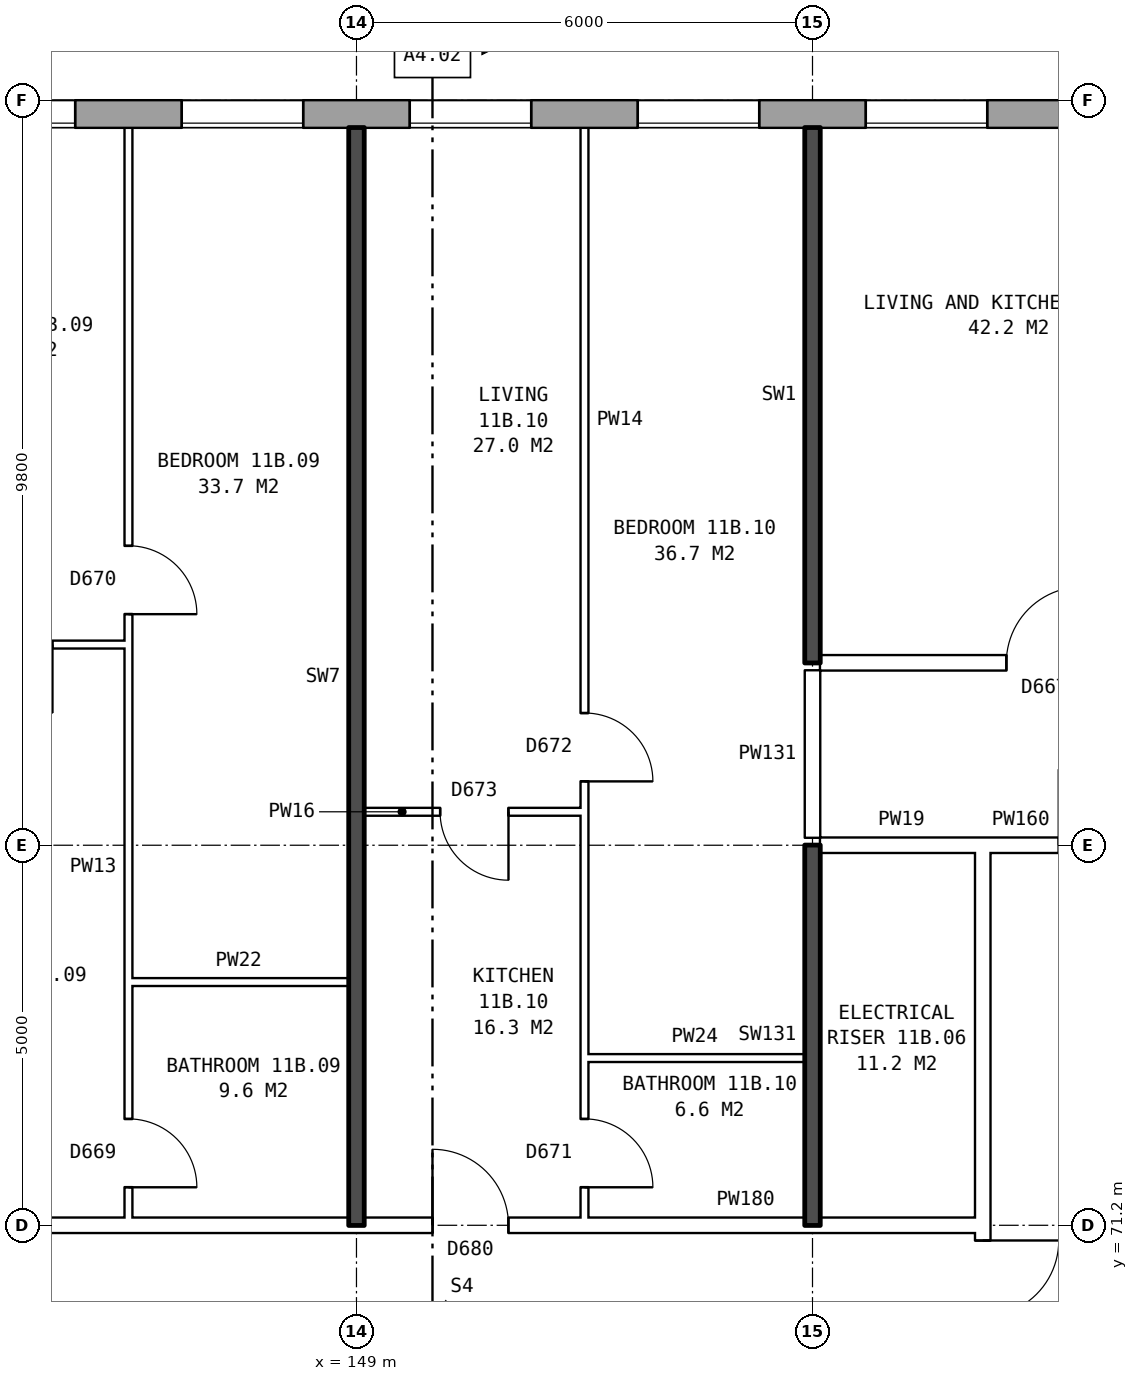
"""IFC4 building model, lengths in metres.
Left out: names, types, materials, properties, quantities, classifications, styles, units other than length and angle.
Written with IfcOpenShell. Run it as: python <this file> out.ifc"""

import sys

from ifc_helpers import new_model, si_unit, direction, frame, frame_2d, origin, place, context, subcontext, project, spatial, rectangle, extrude, element, fill, save


model = new_model("IFC4")
c1 = context("Model", 3, precision=1e-05, world=origin(), true_north=direction((0.0, 1.0)))
c2 = subcontext(c1, "Body", "Model", "MODEL_VIEW")
j1 = project(units=[si_unit("LENGTHUNIT", "METRE"), si_unit("PLANEANGLEUNIT", "RADIAN")], contexts=[c1])
p1 = place(None, origin())
s1 = spatial("IfcSite", under=j1, at=p1, CompositionType="ELEMENT")
p2 = place(p1, origin())
s2 = spatial("IfcBuilding", under=s1, at=p2, CompositionType="ELEMENT")
p3 = place(p2, frame((0.0, 0.0, 44.3)))
s3 = spatial("IfcBuildingStorey", under=s2, at=p3, CompositionType="ELEMENT", Elevation=44.3)
p4 = place(p3, frame((173.425, 85.82, 0.0), z_axis=(0.0, 0.0, 1.0), x_axis=(-1.0, 0.0, 0.0)))
e1 = element("IfcWall", 1, at=p4, inside=s3, PredefinedType="STANDARD", context=c2, shape_type="SweptSolid", body=[
    extrude(rectangle(XDim=39.351, YDim=0.36, at=frame_2d((19.675, 0.0))), origin(), (0.0, 0.0, 1.0), 2.85),
])
p5 = place(p4, frame((1.125, 0.0, 0.8)))
e2 = element("IfcOpeningElement", 2, at=p5, cuts=e1, PredefinedType="OPENING", context=c2, shape_type="SweptSolid", body=[
    extrude(rectangle(XDim=1.6, YDim=1.8, at=frame_2d((0.8, 0.9))), frame((0.0, 0.19, 0.0), z_axis=(0.0, -1.0, 0.0), x_axis=(1.0, 0.0, 0.0)), (0.0, 0.0, 1.0), 0.38),
])
p6 = place(p4, frame((4.125, 0.0, 0.8)))
e3 = element("IfcOpeningElement", 3, at=p6, cuts=e1, PredefinedType="OPENING", context=c2, shape_type="SweptSolid", body=[
    extrude(rectangle(XDim=1.6, YDim=1.8, at=frame_2d((0.8, 0.9))), frame((0.0, 0.19, 0.0), z_axis=(0.0, -1.0, 0.0), x_axis=(1.0, 0.0, 0.0)), (0.0, 0.0, 1.0), 0.38),
])
p7 = place(p4, frame((7.125, 0.0, 0.8)))
e4 = element("IfcOpeningElement", 4, at=p7, cuts=e1, PredefinedType="OPENING", context=c2, shape_type="SweptSolid", body=[
    extrude(rectangle(XDim=1.6, YDim=1.8, at=frame_2d((0.8, 0.9))), frame((0.0, 0.19, 0.0), z_axis=(0.0, -1.0, 0.0), x_axis=(1.0, 0.0, 0.0)), (0.0, 0.0, 1.0), 0.38),
])
p8 = place(p4, frame((10.125, 0.0, 0.8)))
e5 = element("IfcOpeningElement", 5, at=p8, cuts=e1, PredefinedType="OPENING", context=c2, shape_type="SweptSolid", body=[
    extrude(rectangle(XDim=1.6, YDim=1.8, at=frame_2d((0.8, 0.9))), frame((0.0, 0.19, 0.0), z_axis=(0.0, -1.0, 0.0), x_axis=(1.0, 0.0, 0.0)), (0.0, 0.0, 1.0), 0.38),
])
p9 = place(p4, frame((13.125, 0.0, 0.8)))
e6 = element("IfcOpeningElement", 6, at=p9, cuts=e1, PredefinedType="OPENING", context=c2, shape_type="SweptSolid", body=[
    extrude(rectangle(XDim=1.6, YDim=1.8, at=frame_2d((0.8, 0.9))), frame((0.0, 0.19, 0.0), z_axis=(0.0, -1.0, 0.0), x_axis=(1.0, 0.0, 0.0)), (0.0, 0.0, 1.0), 0.38),
])
p10 = place(p4, frame((16.125, 0.0, 0.8)))
e7 = element("IfcOpeningElement", 7, at=p10, cuts=e1, PredefinedType="OPENING", context=c2, shape_type="SweptSolid", body=[
    extrude(rectangle(XDim=1.6, YDim=1.8, at=frame_2d((0.8, 0.9))), frame((0.0, 0.19, 0.0), z_axis=(0.0, -1.0, 0.0), x_axis=(1.0, 0.0, 0.0)), (0.0, 0.0, 1.0), 0.38),
])
p11 = place(p4, frame((19.125, 0.0, 0.8)))
e8 = element("IfcOpeningElement", 8, at=p11, cuts=e1, PredefinedType="OPENING", context=c2, shape_type="SweptSolid", body=[
    extrude(rectangle(XDim=1.6, YDim=1.8, at=frame_2d((0.8, 0.9))), frame((0.0, 0.19, 0.0), z_axis=(0.0, -1.0, 0.0), x_axis=(1.0, 0.0, 0.0)), (0.0, 0.0, 1.0), 0.38),
])
p12 = place(p4, frame((22.125, 0.0, 0.8)))
e9 = element("IfcOpeningElement", 9, at=p12, cuts=e1, PredefinedType="OPENING", context=c2, shape_type="SweptSolid", body=[
    extrude(rectangle(XDim=1.6, YDim=1.8, at=frame_2d((0.8, 0.9))), frame((0.0, 0.19, 0.0), z_axis=(0.0, -1.0, 0.0), x_axis=(1.0, 0.0, 0.0)), (0.0, 0.0, 1.0), 0.38),
])
p13 = place(p4, frame((25.125, 0.0, 0.8)))
e10 = element("IfcOpeningElement", 10, at=p13, cuts=e1, PredefinedType="OPENING", context=c2, shape_type="SweptSolid", body=[
    extrude(rectangle(XDim=1.6, YDim=1.8, at=frame_2d((0.8, 0.9))), frame((0.0, 0.19, 0.0), z_axis=(0.0, -1.0, 0.0), x_axis=(1.0, 0.0, 0.0)), (0.0, 0.0, 1.0), 0.38),
])
p14 = place(p4, frame((28.125, 0.0, 0.8)))
e11 = element("IfcOpeningElement", 11, at=p14, cuts=e1, PredefinedType="OPENING", context=c2, shape_type="SweptSolid", body=[
    extrude(rectangle(XDim=1.6, YDim=1.8, at=frame_2d((0.8, 0.9))), frame((0.0, 0.19, 0.0), z_axis=(0.0, -1.0, 0.0), x_axis=(1.0, 0.0, 0.0)), (0.0, 0.0, 1.0), 0.38),
])
p15 = place(p4, frame((31.125, 0.0, 0.8)))
e12 = element("IfcOpeningElement", 12, at=p15, cuts=e1, PredefinedType="OPENING", context=c2, shape_type="SweptSolid", body=[
    extrude(rectangle(XDim=1.6, YDim=1.8, at=frame_2d((0.8, 0.9))), frame((0.0, 0.19, 0.0), z_axis=(0.0, -1.0, 0.0), x_axis=(1.0, 0.0, 0.0)), (0.0, 0.0, 1.0), 0.38),
])
p16 = place(p4, frame((34.125, 0.0, 0.8)))
e13 = element("IfcOpeningElement", 13, at=p16, cuts=e1, PredefinedType="OPENING", context=c2, shape_type="SweptSolid", body=[
    extrude(rectangle(XDim=1.6, YDim=1.8, at=frame_2d((0.8, 0.9))), frame((0.0, 0.19, 0.0), z_axis=(0.0, -1.0, 0.0), x_axis=(1.0, 0.0, 0.0)), (0.0, 0.0, 1.0), 0.38),
])
p17 = place(p4, frame((36.625, 0.0, 0.8)))
e14 = element("IfcOpeningElement", 14, at=p17, cuts=e1, PredefinedType="OPENING", context=c2, shape_type="SweptSolid", body=[
    extrude(rectangle(XDim=1.4, YDim=1.8, at=frame_2d((0.7, 0.9))), frame((0.0, 0.19, 0.0), z_axis=(0.0, -1.0, 0.0), x_axis=(1.0, 0.0, 0.0)), (0.0, 0.0, 1.0), 0.38),
])
p18 = place(p4, frame((38.325, 0.0, 0.8)))
e15 = element("IfcOpeningElement", 15, at=p18, cuts=e1, PredefinedType="OPENING", context=c2, shape_type="SweptSolid", body=[
    extrude(rectangle(XDim=0.6, YDim=0.9, at=frame_2d((0.3, 0.45))), frame((0.0, 0.19, 0.0), z_axis=(0.0, -1.0, 0.0), x_axis=(1.0, 0.0, 0.0)), (0.0, 0.0, 1.0), 0.38),
])
p19 = place(p3, frame((157.24, 63.9, 0.0), z_axis=(0.0, 0.0, 1.0), x_axis=(0.0, 1.0, 0.0)))
e16 = element("IfcWall", 16, at=p19, inside=s3, PredefinedType="PARTITIONING", context=c2, shape_type="SweptSolid", body=[
    extrude(rectangle(XDim=12.2, YDim=0.2, at=frame_2d((6.1, 0.0))), origin(), (0.0, 0.0, 1.0), 2.85),
])
p20 = place(p19, frame((5.1, 0.0, 0.0)))
e17 = element("IfcOpeningElement", 17, at=p20, cuts=e16, PredefinedType="OPENING", context=c2, shape_type="SweptSolid", body=[
    extrude(rectangle(XDim=2.0, YDim=2.1, at=frame_2d((1.0, 1.05))), frame((0.0, 0.11, 0.0), z_axis=(0.0, -1.0, 0.0), x_axis=(1.0, 0.0, 0.0)), (0.0, 0.0, 1.0), 0.22),
])
p21 = place(p3, frame((142.76, 71.2, 0.0), z_axis=(0.0, 0.0, 1.0), x_axis=(1.0, 0.0, 0.0)))
e18 = element("IfcWall", 18, at=p21, inside=s3, PredefinedType="PARTITIONING", context=c2, shape_type="SweptSolid", body=[
    extrude(rectangle(XDim=14.48, YDim=0.2, at=frame_2d((7.24, 0.0))), origin(), (0.0, 0.0, 1.0), 2.85),
])
p22 = place(p21, frame((1.12, 0.0, 0.0)))
e19 = element("IfcOpeningElement", 19, at=p22, cuts=e18, PredefinedType="OPENING", context=c2, shape_type="SweptSolid", body=[
    extrude(rectangle(XDim=1.0, YDim=2.1, at=frame_2d((0.5, 1.05))), frame((0.0, 0.11, 0.0), z_axis=(0.0, -1.0, 0.0), x_axis=(1.0, 0.0, 0.0)), (0.0, 0.0, 1.0), 0.22),
])
p23 = place(p21, frame((7.24, 0.0, 0.0)))
e20 = element("IfcOpeningElement", 20, at=p23, cuts=e18, PredefinedType="OPENING", context=c2, shape_type="SweptSolid", body=[
    extrude(rectangle(XDim=1.0, YDim=2.1, at=frame_2d((0.5, 1.05))), frame((0.0, 0.11, 0.0), z_axis=(0.0, -1.0, 0.0), x_axis=(1.0, 0.0, 0.0)), (0.0, 0.0, 1.0), 0.22),
])
for number, where, z_axis, x_axis in (
    (21, (152.0, 73.4, 0.0), (0.0, 0.0, 1.0), (1.0, 0.0, 0.0)),
    (22, (146.0, 74.4, 0.0), (0.0, 0.0, 1.0), (1.0, 0.0, 0.0)),
):
    element("IfcWall", number, at=place(p3, frame(where, z_axis=z_axis, x_axis=x_axis)), inside=s3, PredefinedType="PARTITIONING", context=c2, shape_type="SweptSolid", body=[
        extrude(rectangle(XDim=2.9, YDim=0.1, at=frame_2d((1.45, 0.0))), origin(), (0.0, 0.0, 1.0), 2.85),
    ])
p24 = place(p3, frame((155.1, 76.2, 0.0), z_axis=(0.0, 0.0, 1.0), x_axis=(1.0, 0.0, 0.0)))
e23 = element("IfcWall", 23, at=p24, inside=s3, PredefinedType="PARTITIONING", context=c2, shape_type="SweptSolid", body=[
    extrude(rectangle(XDim=2.14, YDim=0.2, at=frame_2d((1.07, 0.0))), origin(), (0.0, 0.0, 1.0), 2.85),
])
p25 = place(p3, frame((157.24, 76.2, 0.0), z_axis=(0.0, 0.0, 1.0), x_axis=(1.0, 0.0, 0.0)))
e24 = element("IfcWall", 24, at=p25, inside=s3, PredefinedType="PARTITIONING", context=c2, shape_type="SweptSolid", body=[
    extrude(rectangle(XDim=3.0, YDim=0.2, at=frame_2d((1.5, 0.0))), origin(), (0.0, 0.0, 1.0), 2.85),
])
p26 = place(p25, frame((1.0, 0.0, 0.0)))
e25 = element("IfcOpeningElement", 25, at=p26, cuts=e24, PredefinedType="OPENING", context=c2, shape_type="SweptSolid", body=[
    extrude(rectangle(XDim=1.0, YDim=2.1, at=frame_2d((0.5, 1.05))), frame((0.0, 0.11, 0.0), z_axis=(0.0, -1.0, 0.0), x_axis=(1.0, 0.0, 0.0)), (0.0, 0.0, 1.0), 0.22),
])
p27 = place(p3, frame((149.1, 76.64, 0.0), z_axis=(0.0, 0.0, 1.0), x_axis=(1.0, 0.0, 0.0)))
e26 = element("IfcWall", 26, at=p27, inside=s3, PredefinedType="PARTITIONING", context=c2, shape_type="SweptSolid", body=[
    extrude(rectangle(XDim=2.9, YDim=0.1, at=frame_2d((1.45, 0.0))), origin(), (0.0, 0.0, 1.0), 2.85),
])
p28 = place(p27, frame((1.0, 0.0, 0.0)))
e27 = element("IfcOpeningElement", 27, at=p28, cuts=e26, PredefinedType="OPENING", context=c2, shape_type="SweptSolid", body=[
    extrude(rectangle(XDim=0.9, YDim=2.1, at=frame_2d((0.45, 1.05))), frame((0.0, 0.06, 0.0), z_axis=(0.0, -1.0, 0.0), x_axis=(1.0, 0.0, 0.0)), (0.0, 0.0, 1.0), 0.12),
])
p29 = place(p3, frame((155.1, 78.6, 0.0), z_axis=(0.0, 0.0, 1.0), x_axis=(1.0, 0.0, 0.0)))
e28 = element("IfcWall", 28, at=p29, inside=s3, PredefinedType="PARTITIONING", context=c2, shape_type="SweptSolid", body=[
    extrude(rectangle(XDim=21.04, YDim=0.2, at=frame_2d((10.52, 0.0))), origin(), (0.0, 0.0, 1.0), 2.85),
])
p30 = place(p29, frame((2.45, 0.0, 0.0)))
e29 = element("IfcOpeningElement", 29, at=p30, cuts=e28, PredefinedType="OPENING", context=c2, shape_type="SweptSolid", body=[
    extrude(rectangle(XDim=1.0, YDim=2.1, at=frame_2d((0.5, 1.05))), frame((0.0, 0.11, 0.0), z_axis=(0.0, -1.0, 0.0), x_axis=(1.0, 0.0, 0.0)), (0.0, 0.0, 1.0), 0.22),
])
p31 = place(p29, frame((14.4, 0.0, 0.0)))
e30 = element("IfcOpeningElement", 30, at=p31, cuts=e28, PredefinedType="OPENING", context=c2, shape_type="SweptSolid", body=[
    extrude(rectangle(XDim=1.0, YDim=2.1, at=frame_2d((0.5, 1.05))), frame((0.0, 0.11, 0.0), z_axis=(0.0, -1.0, 0.0), x_axis=(1.0, 0.0, 0.0)), (0.0, 0.0, 1.0), 0.22),
])
p32 = place(p3, frame((143.1, 78.84, 0.0), z_axis=(0.0, 0.0, 1.0), x_axis=(1.0, 0.0, 0.0)))
e31 = element("IfcWall", 31, at=p32, inside=s3, PredefinedType="PARTITIONING", context=c2, shape_type="SweptSolid", body=[
    extrude(rectangle(XDim=2.9, YDim=0.1, at=frame_2d((1.45, 0.0))), origin(), (0.0, 0.0, 1.0), 2.85),
])
p33 = place(p32, frame((1.0, 0.0, 0.0)))
e32 = element("IfcOpeningElement", 32, at=p33, cuts=e31, PredefinedType="OPENING", context=c2, shape_type="SweptSolid", body=[
    extrude(rectangle(XDim=0.9, YDim=2.1, at=frame_2d((0.45, 1.05))), frame((0.0, 0.06, 0.0), z_axis=(0.0, -1.0, 0.0), x_axis=(1.0, 0.0, 0.0)), (0.0, 0.0, 1.0), 0.12),
])
p34 = place(p3, frame((146.0, 71.3, 0.0), z_axis=(0.0, 0.0, 1.0), x_axis=(0.0, 1.0, 0.0)))
e33 = element("IfcWall", 33, at=p34, inside=s3, PredefinedType="PARTITIONING", context=c2, shape_type="SweptSolid", body=[
    extrude(rectangle(XDim=14.34, YDim=0.1, at=frame_2d((7.17, 0.0))), origin(), (0.0, 0.0, 1.0), 2.85),
])
p35 = place(p34, frame((7.94, 0.0, 0.0)))
e34 = element("IfcOpeningElement", 34, at=p35, cuts=e33, PredefinedType="OPENING", context=c2, shape_type="SweptSolid", body=[
    extrude(rectangle(XDim=0.9, YDim=2.1, at=frame_2d((0.45, 1.05))), frame((0.0, 0.06, 0.0), z_axis=(0.0, -1.0, 0.0), x_axis=(1.0, 0.0, 0.0)), (0.0, 0.0, 1.0), 0.12),
])
p36 = place(p34, frame((0.4, 0.0, 0.0)))
e35 = element("IfcOpeningElement", 35, at=p36, cuts=e33, PredefinedType="OPENING", context=c2, shape_type="SweptSolid", body=[
    extrude(rectangle(XDim=0.9, YDim=2.1, at=frame_2d((0.45, 1.05))), frame((0.0, 0.06, 0.0), z_axis=(0.0, -1.0, 0.0), x_axis=(1.0, 0.0, 0.0)), (0.0, 0.0, 1.0), 0.12),
])
p37 = place(p3, frame((149.0, 71.2, 0.0), z_axis=(0.0, 0.0, 1.0), x_axis=(0.0, 1.0, 0.0)))
e36 = element("IfcWall", 36, at=p37, inside=s3, PredefinedType="SOLIDWALL", context=c2, shape_type="SweptSolid", body=[
    extrude(rectangle(XDim=14.44, YDim=0.2, at=frame_2d((7.22, 0.0))), origin(), (0.0, 0.0, 1.0), 2.85),
])
p38 = place(p3, frame((152.0, 71.3, 0.0), z_axis=(0.0, 0.0, 1.0), x_axis=(0.0, 1.0, 0.0)))
e37 = element("IfcWall", 37, at=p38, inside=s3, PredefinedType="PARTITIONING", context=c2, shape_type="SweptSolid", body=[
    extrude(rectangle(XDim=14.34, YDim=0.1, at=frame_2d((7.17, 0.0))), origin(), (0.0, 0.0, 1.0), 2.85),
])
p39 = place(p38, frame((5.74, 0.0, 0.0)))
e38 = element("IfcOpeningElement", 38, at=p39, cuts=e37, PredefinedType="OPENING", context=c2, shape_type="SweptSolid", body=[
    extrude(rectangle(XDim=0.9, YDim=2.1, at=frame_2d((0.45, 1.05))), frame((0.0, 0.06, 0.0), z_axis=(0.0, -1.0, 0.0), x_axis=(1.0, 0.0, 0.0)), (0.0, 0.0, 1.0), 0.12),
])
p40 = place(p38, frame((0.4, 0.0, 0.0)))
e39 = element("IfcOpeningElement", 39, at=p40, cuts=e37, PredefinedType="OPENING", context=c2, shape_type="SweptSolid", body=[
    extrude(rectangle(XDim=0.9, YDim=2.1, at=frame_2d((0.45, 1.05))), frame((0.0, 0.06, 0.0), z_axis=(0.0, -1.0, 0.0), x_axis=(1.0, 0.0, 0.0)), (0.0, 0.0, 1.0), 0.12),
])
p41 = place(p3, frame((155.0, 71.2, 0.0), z_axis=(0.0, 0.0, 1.0), x_axis=(0.0, 1.0, 0.0)))
e40 = element("IfcWall", 40, at=p41, inside=s3, PredefinedType="SOLIDWALL", context=c2, shape_type="SweptSolid", body=[
    extrude(rectangle(XDim=5.0, YDim=0.2, at=frame_2d((2.5, 0.0))), origin(), (0.0, 0.0, 1.0), 2.85),
])
p42 = place(p3, frame((155.0, 76.3, 0.0), z_axis=(0.0, 0.0, 1.0), x_axis=(0.0, 1.0, 0.0)))
e41 = element("IfcWall", 41, at=p42, inside=s3, PredefinedType="PARTITIONING", context=c2, shape_type="SweptSolid", body=[
    extrude(rectangle(XDim=2.2, YDim=0.2, at=frame_2d((1.1, 0.0))), origin(), (0.0, 0.0, 1.0), 2.85),
])
p43 = place(p3, frame((155.0, 78.6, 0.0), z_axis=(0.0, 0.0, 1.0), x_axis=(0.0, 1.0, 0.0)))
e42 = element("IfcWall", 42, at=p43, inside=s3, PredefinedType="SOLIDWALL", context=c2, shape_type="SweptSolid", body=[
    extrude(rectangle(XDim=7.04, YDim=0.2, at=frame_2d((3.52, 0.0))), origin(), (0.0, 0.0, 1.0), 2.85),
])
p44 = place(p10, origin())
e43 = element("IfcWindow", 43, at=p44, inside=s3, PartitioningType="SINGLE_PANEL", PredefinedType="WINDOW", context=c2, shape_type="SweptSolid", body=[
    extrude(rectangle(XDim=1.6, YDim=1.8, at=frame_2d((0.8, 0.9))), frame((0.0, 0.15, 0.0), z_axis=(0.0, -1.0, 0.0), x_axis=(1.0, 0.0, 0.0)), (0.0, 0.0, 1.0), 0.06),
])
fill(e7, e43)
p45 = place(p11, origin())
e44 = element("IfcWindow", 44, at=p45, inside=s3, PartitioningType="SINGLE_PANEL", PredefinedType="WINDOW", context=c2, shape_type="SweptSolid", body=[
    extrude(rectangle(XDim=1.6, YDim=1.8, at=frame_2d((0.8, 0.9))), frame((0.0, 0.15, 0.0), z_axis=(0.0, -1.0, 0.0), x_axis=(1.0, 0.0, 0.0)), (0.0, 0.0, 1.0), 0.06),
])
fill(e8, e44)
p46 = place(p12, origin())
e45 = element("IfcWindow", 45, at=p46, inside=s3, PartitioningType="SINGLE_PANEL", PredefinedType="WINDOW", context=c2, shape_type="SweptSolid", body=[
    extrude(rectangle(XDim=1.6, YDim=1.8, at=frame_2d((0.8, 0.9))), frame((0.0, 0.15, 0.0), z_axis=(0.0, -1.0, 0.0), x_axis=(1.0, 0.0, 0.0)), (0.0, 0.0, 1.0), 0.06),
])
fill(e9, e45)
p47 = place(p13, origin())
e46 = element("IfcWindow", 46, at=p47, inside=s3, PartitioningType="SINGLE_PANEL", PredefinedType="WINDOW", context=c2, shape_type="SweptSolid", body=[
    extrude(rectangle(XDim=1.6, YDim=1.8, at=frame_2d((0.8, 0.9))), frame((0.0, 0.15, 0.0), z_axis=(0.0, -1.0, 0.0), x_axis=(1.0, 0.0, 0.0)), (0.0, 0.0, 1.0), 0.06),
])
fill(e10, e46)
p48 = place(p14, origin())
e47 = element("IfcWindow", 47, at=p48, inside=s3, PartitioningType="SINGLE_PANEL", PredefinedType="WINDOW", context=c2, shape_type="SweptSolid", body=[
    extrude(rectangle(XDim=1.6, YDim=1.8, at=frame_2d((0.8, 0.9))), frame((0.0, 0.15, 0.0), z_axis=(0.0, -1.0, 0.0), x_axis=(1.0, 0.0, 0.0)), (0.0, 0.0, 1.0), 0.06),
])
fill(e11, e47)
p49 = place(p20, frame((2.0, 0.0, 0.0), z_axis=(0.0, 0.0, 1.0), x_axis=(-1.0, 0.0, 0.0)))
e48 = element("IfcDoor", 48, at=p49, inside=s3, OperationType="DOUBLE_DOOR_SINGLE_SWING", PredefinedType="DOOR", context=c2, shape_type="SweptSolid", body=[
    extrude(rectangle(XDim=2.0, YDim=2.1, at=frame_2d((1.0, 1.05))), frame((0.0, 0.025, 0.0), z_axis=(0.0, -1.0, 0.0), x_axis=(1.0, 0.0, 0.0)), (0.0, 0.0, 1.0), 0.05),
])
fill(e17, e48)
p50 = place(p35, frame((0.9, 0.0, 0.0), z_axis=(0.0, 0.0, 1.0), x_axis=(-1.0, 0.0, 0.0)))
e49 = element("IfcDoor", 49, at=p50, inside=s3, OperationType="SINGLE_SWING_RIGHT", PredefinedType="DOOR", context=c2, shape_type="SweptSolid", body=[
    extrude(rectangle(XDim=0.9, YDim=2.1, at=frame_2d((0.45, 1.05))), frame((0.0, 0.025, 0.0), z_axis=(0.0, -1.0, 0.0), x_axis=(1.0, 0.0, 0.0)), (0.0, 0.0, 1.0), 0.05),
])
fill(e34, e49)
p51 = place(p36, frame((0.9, 0.0, 0.0), z_axis=(0.0, 0.0, 1.0), x_axis=(-1.0, 0.0, 0.0)))
e50 = element("IfcDoor", 50, at=p51, inside=s3, OperationType="SINGLE_SWING_RIGHT", PredefinedType="DOOR", context=c2, shape_type="SweptSolid", body=[
    extrude(rectangle(XDim=0.9, YDim=2.1, at=frame_2d((0.45, 1.05))), frame((0.0, 0.025, 0.0), z_axis=(0.0, -1.0, 0.0), x_axis=(1.0, 0.0, 0.0)), (0.0, 0.0, 1.0), 0.05),
])
fill(e35, e50)
p52 = place(p39, frame((0.9, 0.0, 0.0), z_axis=(0.0, 0.0, 1.0), x_axis=(-1.0, 0.0, 0.0)))
e51 = element("IfcDoor", 51, at=p52, inside=s3, OperationType="SINGLE_SWING_RIGHT", PredefinedType="DOOR", context=c2, shape_type="SweptSolid", body=[
    extrude(rectangle(XDim=0.9, YDim=2.1, at=frame_2d((0.45, 1.05))), frame((0.0, 0.025, 0.0), z_axis=(0.0, -1.0, 0.0), x_axis=(1.0, 0.0, 0.0)), (0.0, 0.0, 1.0), 0.05),
])
fill(e38, e51)
p53 = place(p23, origin())
e52 = element("IfcDoor", 52, at=p53, inside=s3, OperationType="SINGLE_SWING_LEFT", PredefinedType="DOOR", context=c2, shape_type="SweptSolid", body=[
    extrude(rectangle(XDim=1.0, YDim=2.1, at=frame_2d((0.5, 1.05))), frame((0.0, 0.025, 0.0), z_axis=(0.0, -1.0, 0.0), x_axis=(1.0, 0.0, 0.0)), (0.0, 0.0, 1.0), 0.05),
])
fill(e20, e52)
p54 = place(p28, frame((0.9, 0.0, 0.0), z_axis=(0.0, 0.0, 1.0), x_axis=(-1.0, 0.0, 0.0)))
e53 = element("IfcDoor", 53, at=p54, inside=s3, OperationType="SINGLE_SWING_LEFT", PredefinedType="DOOR", context=c2, shape_type="SweptSolid", body=[
    extrude(rectangle(XDim=0.9, YDim=2.1, at=frame_2d((0.45, 1.05))), frame((0.0, 0.025, 0.0), z_axis=(0.0, -1.0, 0.0), x_axis=(1.0, 0.0, 0.0)), (0.0, 0.0, 1.0), 0.05),
])
fill(e27, e53)
p55 = place(p40, frame((0.9, 0.0, 0.0), z_axis=(0.0, 0.0, 1.0), x_axis=(-1.0, 0.0, 0.0)))
e54 = element("IfcDoor", 54, at=p55, inside=s3, OperationType="SINGLE_SWING_RIGHT", PredefinedType="DOOR", context=c2, shape_type="SweptSolid", body=[
    extrude(rectangle(XDim=0.9, YDim=2.1, at=frame_2d((0.45, 1.05))), frame((0.0, 0.025, 0.0), z_axis=(0.0, -1.0, 0.0), x_axis=(1.0, 0.0, 0.0)), (0.0, 0.0, 1.0), 0.05),
])
fill(e39, e54)
p56 = place(p30, origin())
e55 = element("IfcDoor", 55, at=p56, inside=s3, OperationType="SINGLE_SWING_RIGHT", PredefinedType="DOOR", context=c2, shape_type="SweptSolid", body=[
    extrude(rectangle(XDim=1.0, YDim=2.1, at=frame_2d((0.5, 1.05))), frame((0.0, 0.025, 0.0), z_axis=(0.0, -1.0, 0.0), x_axis=(1.0, 0.0, 0.0)), (0.0, 0.0, 1.0), 0.05),
])
fill(e29, e55)
save(model, sys.argv[1])
